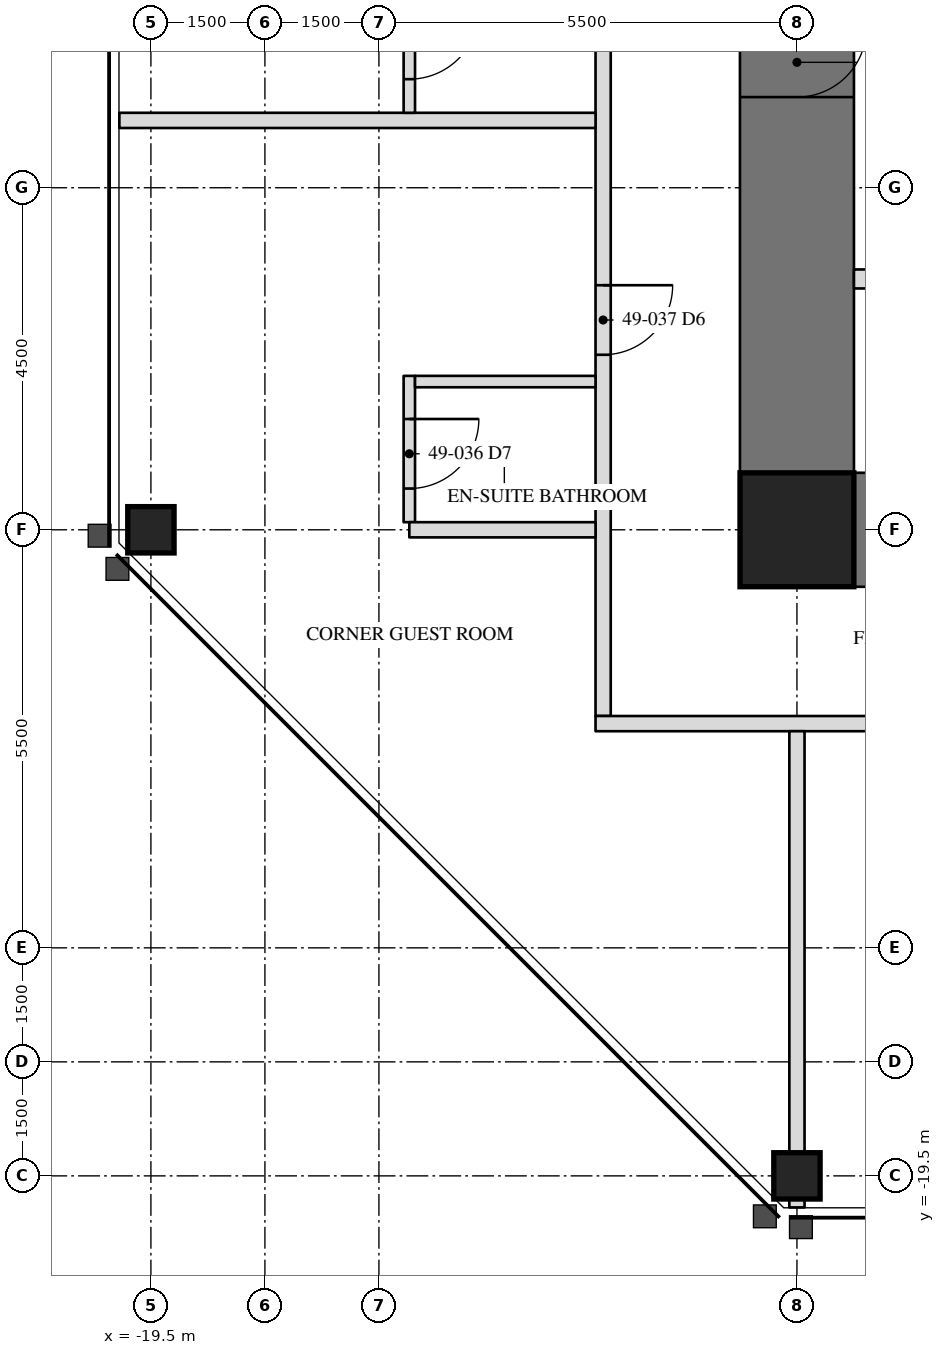
"""IFC4 building model, lengths in metres.
Left out: names, types, materials, properties, quantities, classifications, styles, units other than length and angle.
Written with IfcOpenShell. Run it as: python <this file> out.ifc"""

import sys

from ifc_helpers import new_model, si_unit, direction, frame, frame_2d, origin, origin_2d, place, context, subcontext, project, spatial, rectangle, hollow_rectangle, extrude, element, fill, save


model = new_model("IFC4")
c1 = context("Model", 3, precision=1e-05, world=origin(), true_north=direction((0.0, 1.0)))
c2 = subcontext(c1, "Body", "Model", "MODEL_VIEW")
j1 = project(units=[si_unit("LENGTHUNIT", "METRE"), si_unit("PLANEANGLEUNIT", "RADIAN")], contexts=[c1])
p1 = place(None, origin())
s1 = spatial("IfcSite", under=j1, at=p1, CompositionType="ELEMENT")
p2 = place(p1, origin())
s2 = spatial("IfcBuilding", under=s1, at=p2, CompositionType="ELEMENT")
p3 = place(p2, frame((0.0, 0.0, 208.2)))
s3 = spatial("IfcBuildingStorey", under=s2, at=p3, CompositionType="ELEMENT", Elevation=208.2)
for number, where, z_axis, x_axis in (
    (1, (-19.5, -11.0, 0.0), (0.0, 0.0, 1.0), (0.0, 1.0, 0.0)),
    (2, (-11.0, -19.5, 0.0), (0.0, 0.0, 1.0), (1.0, 0.0, 0.0)),
):
    element("IfcColumn", number, at=place(p3, frame(where, z_axis=z_axis, x_axis=x_axis)), inside=s3, PredefinedType="COLUMN", context=c2, shape_type="SweptSolid", body=[
        extrude(hollow_rectangle(XDim=0.61, YDim=0.61, WallThickness=0.076, at=origin_2d()), origin(), (0.0, 0.0, 1.0), 3.5),
    ])
p4 = place(p3, frame((-11.0, 11.0, 0.0), z_axis=(0.0, 0.0, 1.0), x_axis=(0.0, -1.0, 0.0)))
e3 = element("IfcWall", 3, at=p4, inside=s3, PredefinedType="SHEAR", context=c2, shape_type="SweptSolid", body=[
    extrude(rectangle(XDim=22.0, YDim=1.5, at=frame_2d((11.0, 0.0))), origin(), (0.0, 0.0, 1.0), 3.5),
])
p5 = place(p4, frame((15.393, 0.0, 0.0)))
e4 = element("IfcOpeningElement", 4, at=p5, cuts=e3, PredefinedType="OPENING", context=c2, shape_type="SweptSolid", body=[
    extrude(rectangle(XDim=0.915, YDim=2.134, at=frame_2d((0.458, 1.067))), frame((0.0, 0.76, 0.0), z_axis=(0.0, -1.0, 0.0), x_axis=(1.0, 0.0, 0.0)), (0.0, 0.0, 1.0), 1.52),
])
p6 = place(p3, frame((-11.0, -11.0, 0.0), z_axis=(0.0, 0.0, 1.0), x_axis=(1.0, 0.0, 0.0)))
e5 = element("IfcWall", 5, at=p6, inside=s3, PredefinedType="SHEAR", context=c2, shape_type="SweptSolid", body=[
    extrude(rectangle(XDim=4.5, YDim=1.5, at=frame_2d((2.25, 0.0))), origin(), (0.0, 0.0, 1.0), 3.5),
])
p7 = place(p3, frame((-11.0, -11.0, 0.0), z_axis=(0.0, 0.0, 1.0), x_axis=(1.0, 0.0, 0.0)))
e6 = element("IfcColumn", 6, at=p7, inside=s3, PredefinedType="COLUMN", context=c2, shape_type="SweptSolid", body=[
    extrude(hollow_rectangle(XDim=1.499, YDim=1.499, WallThickness=0.102, at=origin_2d()), origin(), (0.0, 0.0, 1.0), 3.5),
])
p8 = place(p3, frame((-6.95, -7.7, 0.0), z_axis=(0.0, 0.0, 1.0), x_axis=(-1.0, 0.0, 0.0)))
e7 = element("IfcWall", 7, at=p8, inside=s3, PredefinedType="PARTITIONING", context=c2, shape_type="SweptSolid", body=[
    extrude(rectangle(XDim=3.3, YDim=0.25, at=frame_2d((1.65, 0.0))), origin(), (0.0, 0.0, 1.0), 3.31),
])
p9 = place(p8, frame((0.45, 0.0, 0.0)))
e8 = element("IfcOpeningElement", 8, at=p9, cuts=e7, PredefinedType="OPENING", context=c2, shape_type="SweptSolid", body=[
    extrude(rectangle(XDim=1.219, YDim=2.134, at=frame_2d((0.609, 1.067))), frame((0.0, 0.135, 0.0), z_axis=(0.0, -1.0, 0.0), x_axis=(1.0, 0.0, 0.0)), (0.0, 0.0, 1.0), 0.27),
])
p10 = place(p3, frame((-13.55, 13.65, 0.0), z_axis=(0.0, 0.0, 1.0), x_axis=(0.0, -1.0, 0.0)))
e9 = element("IfcWall", 9, at=p10, inside=s3, PredefinedType="PARTITIONING", context=c2, shape_type="SweptSolid", body=[
    extrude(rectangle(XDim=27.1, YDim=0.2, at=frame_2d((13.55, 0.0))), origin(), (0.0, 0.0, 1.0), 3.31),
])
p11 = place(p10, frame((4.884, 0.0, 0.0)))
e10 = element("IfcOpeningElement", 10, at=p11, cuts=e9, PredefinedType="OPENING", context=c2, shape_type="SweptSolid", body=[
    extrude(rectangle(XDim=0.915, YDim=2.134, at=frame_2d((0.458, 1.067))), frame((0.0, 0.11, 0.0), z_axis=(0.0, -1.0, 0.0), x_axis=(1.0, 0.0, 0.0)), (0.0, 0.0, 1.0), 0.22),
])
p12 = place(p10, frame((10.433, 0.0, 0.0)))
e11 = element("IfcOpeningElement", 11, at=p12, cuts=e9, PredefinedType="OPENING", context=c2, shape_type="SweptSolid", body=[
    extrude(rectangle(XDim=0.915, YDim=2.134, at=frame_2d((0.458, 1.067))), frame((0.0, 0.11, 0.0), z_axis=(0.0, -1.0, 0.0), x_axis=(1.0, 0.0, 0.0)), (0.0, 0.0, 1.0), 0.22),
])
p13 = place(p10, frame((16.046, 0.0, 0.0)))
e12 = element("IfcOpeningElement", 12, at=p13, cuts=e9, PredefinedType="OPENING", context=c2, shape_type="SweptSolid", body=[
    extrude(rectangle(XDim=0.915, YDim=2.134, at=frame_2d((0.458, 1.067))), frame((0.0, 0.11, 0.0), z_axis=(0.0, -1.0, 0.0), x_axis=(1.0, 0.0, 0.0)), (0.0, 0.0, 1.0), 0.22),
])
p14 = place(p10, frame((21.433, 0.0, 0.0)))
e13 = element("IfcOpeningElement", 13, at=p14, cuts=e9, PredefinedType="OPENING", context=c2, shape_type="SweptSolid", body=[
    extrude(rectangle(XDim=0.915, YDim=2.134, at=frame_2d((0.458, 1.067))), frame((0.0, 0.11, 0.0), z_axis=(0.0, -1.0, 0.0), x_axis=(1.0, 0.0, 0.0)), (0.0, 0.0, 1.0), 0.22),
])
p15 = place(p3, frame((-13.65, -13.55, 0.0), z_axis=(0.0, 0.0, 1.0), x_axis=(1.0, 0.0, 0.0)))
e14 = element("IfcWall", 14, at=p15, inside=s3, PredefinedType="PARTITIONING", context=c2, shape_type="SweptSolid", body=[
    extrude(rectangle(XDim=27.1, YDim=0.2, at=frame_2d((13.55, 0.0))), origin(), (0.0, 0.0, 1.0), 3.31),
])
p16 = place(p15, frame((4.884, 0.0, 0.0)))
e15 = element("IfcOpeningElement", 15, at=p16, cuts=e14, PredefinedType="OPENING", context=c2, shape_type="SweptSolid", body=[
    extrude(rectangle(XDim=0.915, YDim=2.134, at=frame_2d((0.458, 1.067))), frame((0.0, 0.11, 0.0), z_axis=(0.0, -1.0, 0.0), x_axis=(1.0, 0.0, 0.0)), (0.0, 0.0, 1.0), 0.22),
])
p17 = place(p15, frame((10.433, 0.0, 0.0)))
e16 = element("IfcOpeningElement", 16, at=p17, cuts=e14, PredefinedType="OPENING", context=c2, shape_type="SweptSolid", body=[
    extrude(rectangle(XDim=0.915, YDim=2.134, at=frame_2d((0.458, 1.067))), frame((0.0, 0.11, 0.0), z_axis=(0.0, -1.0, 0.0), x_axis=(1.0, 0.0, 0.0)), (0.0, 0.0, 1.0), 0.22),
])
p18 = place(p15, frame((16.046, 0.0, 0.0)))
e17 = element("IfcOpeningElement", 17, at=p18, cuts=e14, PredefinedType="OPENING", context=c2, shape_type="SweptSolid", body=[
    extrude(rectangle(XDim=0.915, YDim=2.134, at=frame_2d((0.458, 1.067))), frame((0.0, 0.11, 0.0), z_axis=(0.0, -1.0, 0.0), x_axis=(1.0, 0.0, 0.0)), (0.0, 0.0, 1.0), 0.22),
])
p19 = place(p15, frame((21.433, 0.0, 0.0)))
e18 = element("IfcOpeningElement", 18, at=p19, cuts=e14, PredefinedType="OPENING", context=c2, shape_type="SweptSolid", body=[
    extrude(rectangle(XDim=0.915, YDim=2.134, at=frame_2d((0.458, 1.067))), frame((0.0, 0.11, 0.0), z_axis=(0.0, -1.0, 0.0), x_axis=(1.0, 0.0, 0.0)), (0.0, 0.0, 1.0), 0.22),
])
p20 = place(p3, frame((-13.65, -5.614, 0.0), z_axis=(0.0, 0.0, 1.0), x_axis=(-1.0, 0.0, 0.0)))
e19 = element("IfcWall", 19, at=p20, inside=s3, PredefinedType="PARTITIONING", context=c2, shape_type="SweptSolid", body=[
    extrude(rectangle(XDim=6.265, YDim=0.2, at=frame_2d((3.133, 0.0))), origin(), (0.0, 0.0, 1.0), 3.31),
])
p21 = place(p3, frame((-16.1, -3.589, 0.0), z_axis=(0.0, 0.0, 1.0), x_axis=(0.0, -1.0, 0.0)))
e20 = element("IfcWall", 20, at=p21, inside=s3, PredefinedType="PARTITIONING", context=c2, shape_type="SweptSolid", body=[
    extrude(rectangle(XDim=1.925, YDim=0.15, at=frame_2d((0.962, 0.0))), origin(), (0.0, 0.0, 1.0), 3.31),
])
p22 = place(p21, frame((0.567, 0.0, 0.0)))
e21 = element("IfcOpeningElement", 21, at=p22, cuts=e20, PredefinedType="OPENING", context=c2, shape_type="SweptSolid", body=[
    extrude(rectangle(XDim=0.915, YDim=2.032, at=frame_2d((0.458, 1.016))), frame((0.0, 0.085, 0.0), z_axis=(0.0, -1.0, 0.0), x_axis=(1.0, 0.0, 0.0)), (0.0, 0.0, 1.0), 0.17),
])
p23 = place(p3, frame((-16.1, -8.975, 0.0), z_axis=(0.0, 0.0, 1.0), x_axis=(0.0, -1.0, 0.0)))
e22 = element("IfcWall", 22, at=p23, inside=s3, PredefinedType="PARTITIONING", context=c2, shape_type="SweptSolid", body=[
    extrude(rectangle(XDim=1.925, YDim=0.15, at=frame_2d((0.962, 0.0))), origin(), (0.0, 0.0, 1.0), 3.31),
])
p24 = place(p23, frame((0.567, 0.0, 0.0)))
e23 = element("IfcOpeningElement", 23, at=p24, cuts=e22, PredefinedType="OPENING", context=c2, shape_type="SweptSolid", body=[
    extrude(rectangle(XDim=0.915, YDim=2.032, at=frame_2d((0.458, 1.016))), frame((0.0, 0.085, 0.0), z_axis=(0.0, -1.0, 0.0), x_axis=(1.0, 0.0, 0.0)), (0.0, 0.0, 1.0), 0.17),
])
p25 = place(p3, frame((-13.65, -9.05, 0.0), z_axis=(0.0, 0.0, 1.0), x_axis=(-1.0, 0.0, 0.0)))
e24 = element("IfcWall", 24, at=p25, inside=s3, PredefinedType="PARTITIONING", context=c2, shape_type="SweptSolid", body=[
    extrude(rectangle(XDim=2.375, YDim=0.15, at=frame_2d((1.188, 0.0))), origin(), (0.0, 0.0, 1.0), 3.31),
])
p26 = place(p3, frame((-13.65, -11.0, 0.0), z_axis=(0.0, 0.0, 1.0), x_axis=(-1.0, 0.0, 0.0)))
e25 = element("IfcWall", 25, at=p26, inside=s3, PredefinedType="PARTITIONING", context=c2, shape_type="SweptSolid", body=[
    extrude(rectangle(XDim=2.45, YDim=0.2, at=frame_2d((1.225, 0.0))), origin(), (0.0, 0.0, 1.0), 2.802),
])
p27 = place(p3, frame((-11.0, -13.65, 0.0), z_axis=(0.0, 0.0, 1.0), x_axis=(0.0, -1.0, 0.0)))
e26 = element("IfcWall", 26, at=p27, inside=s3, PredefinedType="PARTITIONING", context=c2, shape_type="SweptSolid", body=[
    extrude(rectangle(XDim=6.265, YDim=0.2, at=frame_2d((3.133, 0.0))), origin(), (0.0, 0.0, 1.0), 2.802),
])
p28 = place(p5, origin())
e27 = element("IfcDoor", 27, at=p28, inside=s3, OperationType="SINGLE_SWING_RIGHT", PredefinedType="DOOR", context=c2, shape_type="SweptSolid", body=[
    extrude(rectangle(XDim=0.915, YDim=2.134, at=frame_2d((0.458, 1.067))), frame((0.0, -0.675, 0.0), z_axis=(0.0, -1.0, 0.0), x_axis=(1.0, 0.0, 0.0)), (0.0, 0.0, 1.0), 0.05),
])
fill(e4, e27)
p29 = place(p22, origin())
e28 = element("IfcDoor", 28, at=p29, inside=s3, OperationType="SINGLE_SWING_LEFT", PredefinedType="DOOR", context=c2, shape_type="SweptSolid", body=[
    extrude(rectangle(XDim=0.915, YDim=2.032, at=frame_2d((0.458, 1.016))), frame((0.0, 0.025, 0.0), z_axis=(0.0, -1.0, 0.0), x_axis=(1.0, 0.0, 0.0)), (0.0, 0.0, 1.0), 0.05),
])
fill(e21, e28)
p30 = place(p24, origin())
e29 = element("IfcDoor", 29, at=p30, inside=s3, OperationType="SINGLE_SWING_LEFT", PredefinedType="DOOR", context=c2, shape_type="SweptSolid", body=[
    extrude(rectangle(XDim=0.915, YDim=2.032, at=frame_2d((0.458, 1.016))), frame((0.0, 0.025, 0.0), z_axis=(0.0, -1.0, 0.0), x_axis=(1.0, 0.0, 0.0)), (0.0, 0.0, 1.0), 0.05),
])
fill(e23, e29)
p31 = place(p14, origin())
e30 = element("IfcDoor", 30, at=p31, inside=s3, OperationType="SINGLE_SWING_LEFT", PredefinedType="DOOR", context=c2, shape_type="SweptSolid", body=[
    extrude(rectangle(XDim=0.915, YDim=2.134, at=frame_2d((0.458, 1.067))), frame((0.0, 0.025, 0.0), z_axis=(0.0, -1.0, 0.0), x_axis=(1.0, 0.0, 0.0)), (0.0, 0.0, 1.0), 0.05),
])
fill(e13, e30)
save(model, sys.argv[1])
